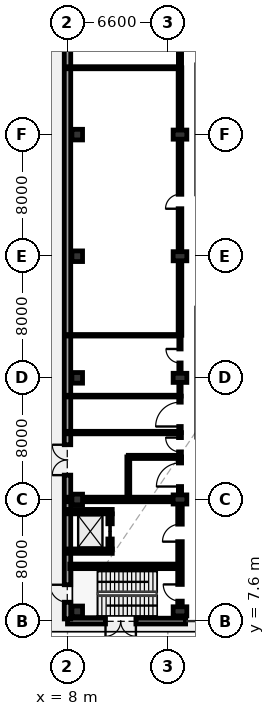
"""IFC4 building model, lengths in metres.
Left out: names, types, materials, properties, quantities, classifications, styles, units other than length and angle.
Written with IfcOpenShell. Run it as: python <this file> out.ifc"""

import sys

from ifc_helpers import new_model, si_unit, direction, frame, frame_2d, origin, origin_2d, place, context, subcontext, project, spatial, rectangle, extrude, element, fill, save


model = new_model("IFC4")
c1 = context("Model", 3, precision=1e-05, world=origin(), true_north=direction((0.0, 1.0)))
c2 = subcontext(c1, "Body", "Model", "MODEL_VIEW")
j1 = project(units=[si_unit("LENGTHUNIT", "METRE"), si_unit("PLANEANGLEUNIT", "RADIAN")], contexts=[c1])
p1 = place(None, origin())
s1 = spatial("IfcSite", under=j1, at=p1, CompositionType="ELEMENT")
p2 = place(p1, origin())
s2 = spatial("IfcBuilding", under=s1, at=p2, CompositionType="ELEMENT")
p3 = place(p2, origin())
s3 = spatial("IfcBuildingStorey", under=s2, at=p3, CompositionType="ELEMENT", Elevation=0.0)
for number, where, z_axis, x_axis in (
    (1, (8.64, 8.24, 0.0), (0.0, 0.0, 1.0), (1.0, 0.0, 0.0)),
    (2, (8.64, 15.6, 0.0), (0.0, 0.0, 1.0), (1.0, 0.0, 0.0)),
    (3, (8.64, 23.6, 0.0), (0.0, 0.0, 1.0), (1.0, 0.0, 0.0)),
    (4, (8.64, 31.6, 0.0), (0.0, 0.0, 1.0), (1.0, 0.0, 0.0)),
    (5, (8.64, 39.6, 0.0), (0.0, 0.0, 1.0), (1.0, 0.0, 0.0)),
):
    element("IfcColumn", number, at=place(p3, frame(where, z_axis=z_axis, x_axis=x_axis)), inside=s3, PredefinedType="COLUMN", context=c2, shape_type="SweptSolid", body=[
        extrude(rectangle(XDim=0.7, YDim=0.7, at=origin_2d()), origin(), (0.0, 0.0, 1.0), 5.4),
    ])
for number, where, z_axis, x_axis in (
    (6, (15.4, 8.24, 0.0), (0.0, 0.0, 1.0), (1.0, 0.0, 0.0)),
    (7, (15.4, 15.6, 0.0), (0.0, 0.0, 1.0), (1.0, 0.0, 0.0)),
    (8, (15.4, 23.6, 0.0), (0.0, 0.0, 1.0), (1.0, 0.0, 0.0)),
    (9, (15.4, 31.6, 0.0), (0.0, 0.0, 1.0), (1.0, 0.0, 0.0)),
    (10, (15.4, 39.6, 0.0), (0.0, 0.0, 1.0), (1.0, 0.0, 0.0)),
):
    element("IfcColumn", number, at=place(p3, frame(where, z_axis=z_axis, x_axis=x_axis)), inside=s3, PredefinedType="COLUMN", context=c2, shape_type="SweptSolid", body=[
        extrude(rectangle(XDim=0.6, YDim=0.9, at=origin_2d()), origin(), (0.0, 0.0, 1.0), 5.4),
    ])
p4 = place(p3, frame((15.77, 7.6, 0.0), z_axis=(0.0, 0.0, 1.0), x_axis=(-1.0, 0.0, 0.0)))
e11 = element("IfcWall", 11, at=p4, inside=s3, PredefinedType="SOLIDWALL", context=c2, shape_type="SweptSolid", body=[
    extrude(rectangle(XDim=7.77, YDim=0.38, at=frame_2d((3.885, 0.0))), origin(), (0.0, 0.0, 1.0), 5.14),
])
p5 = place(p4, frame((3.27, 0.0, 0.0)))
e12 = element("IfcOpeningElement", 12, at=p5, cuts=e11, PredefinedType="OPENING", context=c2, shape_type="SweptSolid", body=[
    extrude(rectangle(XDim=2.0, YDim=2.5, at=frame_2d((1.0, 1.25))), frame((0.0, 0.2, 0.0), z_axis=(0.0, -1.0, 0.0), x_axis=(1.0, 0.0, 0.0)), (0.0, 0.0, 1.0), 0.4),
])
p6 = place(p3, frame((8.0, 7.74, 0.0), z_axis=(0.0, 0.0, 1.0), x_axis=(0.0, 1.0, 0.0)))
e13 = element("IfcWall", 13, at=p6, inside=s3, PredefinedType="SOLIDWALL", context=c2, shape_type="SweptSolid", body=[
    extrude(rectangle(XDim=55.72, YDim=0.425, at=frame_2d((27.86, 0.0))), origin(), (0.0, 0.0, 1.0), 5.14),
])
p7 = place(p6, frame((1.1, 0.0, 0.0)))
e14 = element("IfcOpeningElement", 14, at=p7, cuts=e13, PredefinedType="OPENING", context=c2, shape_type="SweptSolid", body=[
    extrude(rectangle(XDim=1.15, YDim=2.2, at=frame_2d((0.575, 1.1))), frame((0.0, 0.222, 0.0), z_axis=(0.0, -1.0, 0.0), x_axis=(1.0, 0.0, 0.0)), (0.0, 0.0, 1.0), 0.445),
])
p8 = place(p6, frame((9.46, 0.0, 0.0)))
e15 = element("IfcOpeningElement", 15, at=p8, cuts=e13, PredefinedType="OPENING", context=c2, shape_type="SweptSolid", body=[
    extrude(rectangle(XDim=2.0, YDim=2.5, at=frame_2d((1.0, 1.25))), frame((0.0, 0.222, 0.0), z_axis=(0.0, -1.0, 0.0), x_axis=(1.0, 0.0, 0.0)), (0.0, 0.0, 1.0), 0.445),
])
p9 = place(p3, frame((7.85, 15.6, 0.0), z_axis=(0.0, 0.0, 1.0), x_axis=(1.0, 0.0, 0.0)))
e16 = element("IfcWall", 16, at=p9, inside=s3, PredefinedType="SHEAR", context=c2, shape_type="SweptSolid", body=[
    extrude(rectangle(XDim=7.248, YDim=0.3, at=frame_2d((3.624, 0.0))), origin(), (0.0, 0.0, 1.0), 5.14),
])
p10 = place(p3, frame((15.4, 8.692, 0.0), z_axis=(0.0, 0.0, 1.0), x_axis=(0.0, 1.0, 0.0)))
e17 = element("IfcWall", 17, at=p10, inside=s3, PredefinedType="SHEAR", context=c2, shape_type="SweptSolid", body=[
    extrude(rectangle(XDim=6.456, YDim=0.3, at=frame_2d((3.228, 0.0))), origin(), (0.0, 0.0, 1.0), 5.14),
])
p11 = place(p10, frame((0.22, 0.0, 0.0)))
e18 = element("IfcOpeningElement", 18, at=p11, cuts=e17, PredefinedType="OPENING", context=c2, shape_type="SweptSolid", body=[
    extrude(rectangle(XDim=1.1, YDim=2.15, at=frame_2d((0.55, 1.075))), frame((0.0, 0.16, 0.0), z_axis=(0.0, -1.0, 0.0), x_axis=(1.0, 0.0, 0.0)), (0.0, 0.0, 1.0), 0.32),
])
p12 = place(p10, frame((4.133, 0.0, 0.0)))
e19 = element("IfcOpeningElement", 19, at=p12, cuts=e17, PredefinedType="OPENING", context=c2, shape_type="SweptSolid", body=[
    extrude(rectangle(XDim=1.15, YDim=2.2, at=frame_2d((0.575, 1.1))), frame((0.0, 0.16, 0.0), z_axis=(0.0, -1.0, 0.0), x_axis=(1.0, 0.0, 0.0)), (0.0, 0.0, 1.0), 0.32),
])
p13 = place(p3, frame((8.15, 11.2, 0.0), z_axis=(0.0, 0.0, 1.0), x_axis=(1.0, 0.0, 0.0)))
e20 = element("IfcWall", 20, at=p13, inside=s3, PredefinedType="SHEAR", context=c2, shape_type="SweptSolid", body=[
    extrude(rectangle(XDim=7.1, YDim=0.3, at=frame_2d((3.55, 0.0))), origin(), (0.0, 0.0, 1.0), 5.14),
])
for number, where, z_axis, x_axis in (
    (21, (8.055, 12.2, 0.0), (0.0, 0.0, 1.0), (1.0, 0.0, 0.0)),
    (22, (8.055, 14.8, 0.0), (0.0, 0.0, 1.0), (1.0, 0.0, 0.0)),
):
    element("IfcWall", number, at=place(p3, frame(where, z_axis=z_axis, x_axis=x_axis)), inside=s3, PredefinedType="SHEAR", context=c2, shape_type="SweptSolid", body=[
        extrude(rectangle(XDim=2.89, YDim=0.29, at=frame_2d((1.445, 0.0))), origin(), (0.0, 0.0, 1.0), 5.14),
    ])
p14 = place(p3, frame((10.8, 12.345, 0.0), z_axis=(0.0, 0.0, 1.0), x_axis=(0.0, 1.0, 0.0)))
e23 = element("IfcWall", 23, at=p14, inside=s3, PredefinedType="SHEAR", context=c2, shape_type="SweptSolid", body=[
    extrude(rectangle(XDim=2.31, YDim=0.29, at=frame_2d((1.155, 0.0))), origin(), (0.0, 0.0, 1.0), 5.14),
])
p15 = place(p14, frame((0.655, 0.0, 0.0)))
e24 = element("IfcOpeningElement", 24, at=p15, cuts=e23, PredefinedType="OPENING", context=c2, shape_type="SweptSolid", body=[
    extrude(rectangle(XDim=1.0, YDim=2.15, at=frame_2d((0.5, 1.075))), frame((0.0, 0.155, 0.0), z_axis=(0.0, -1.0, 0.0), x_axis=(1.0, 0.0, 0.0)), (0.0, 0.0, 1.0), 0.31),
])
p16 = place(p3, frame((15.4, 16.052, 0.0), z_axis=(0.0, 0.0, 1.0), x_axis=(0.0, 1.0, 0.0)))
e25 = element("IfcWall", 25, at=p16, inside=s3, PredefinedType="PARTITIONING", context=c2, shape_type="SweptSolid", body=[
    extrude(rectangle(XDim=2.348, YDim=0.21, at=frame_2d((1.174, 0.0))), origin(), (0.0, 0.0, 1.0), 4.29),
])
p17 = place(p16, frame((0.399, 0.0, 0.0)))
e26 = element("IfcOpeningElement", 26, at=p17, cuts=e25, PredefinedType="OPENING", context=c2, shape_type="SweptSolid", body=[
    extrude(rectangle(XDim=1.55, YDim=2.25, at=frame_2d((0.775, 1.125))), frame((0.0, 0.115, 0.0), z_axis=(0.0, -1.0, 0.0), x_axis=(1.0, 0.0, 0.0)), (0.0, 0.0, 1.0), 0.23),
])
p18 = place(p3, frame((15.4, 18.4, 0.0), z_axis=(0.0, 0.0, 1.0), x_axis=(0.0, 1.0, 0.0)))
e27 = element("IfcWall", 27, at=p18, inside=s3, PredefinedType="PARTITIONING", context=c2, shape_type="SweptSolid", body=[
    extrude(rectangle(XDim=1.6, YDim=0.19, at=frame_2d((0.8, 0.0))), origin(), (0.0, 0.0, 1.0), 4.29),
])
p19 = place(p18, frame((0.33, 0.0, 0.0)))
e28 = element("IfcOpeningElement", 28, at=p19, cuts=e27, PredefinedType="OPENING", context=c2, shape_type="SweptSolid", body=[
    extrude(rectangle(XDim=0.94, YDim=2.15, at=frame_2d((0.47, 1.075))), frame((0.0, 0.105, 0.0), z_axis=(0.0, -1.0, 0.0), x_axis=(1.0, 0.0, 0.0)), (0.0, 0.0, 1.0), 0.21),
])
p20 = place(p3, frame((15.4, 20.0, 0.0), z_axis=(0.0, 0.0, 1.0), x_axis=(0.0, 1.0, 0.0)))
e29 = element("IfcWall", 29, at=p20, inside=s3, PredefinedType="PARTITIONING", context=c2, shape_type="SweptSolid", body=[
    extrude(rectangle(XDim=2.4, YDim=0.165, at=frame_2d((1.2, 0.0))), origin(), (0.0, 0.0, 1.0), 4.29),
])
p21 = place(p20, frame((0.4, 0.0, 0.0)))
e30 = element("IfcOpeningElement", 30, at=p21, cuts=e29, PredefinedType="OPENING", context=c2, shape_type="SweptSolid", body=[
    extrude(rectangle(XDim=1.6, YDim=2.3, at=frame_2d((0.8, 1.15))), frame((0.0, 0.093, 0.0), z_axis=(0.0, -1.0, 0.0), x_axis=(1.0, 0.0, 0.0)), (0.0, 0.0, 1.0), 0.185),
])
p22 = place(p3, frame((15.4, 22.4, 0.0), z_axis=(0.0, 0.0, 1.0), x_axis=(0.0, 1.0, 0.0)))
e31 = element("IfcWall", 31, at=p22, inside=s3, PredefinedType="PARTITIONING", context=c2, shape_type="SweptSolid", body=[
    extrude(rectangle(XDim=4.0, YDim=0.15, at=frame_2d((2.0, 0.0))), origin(), (0.0, 0.0, 1.0), 4.29),
])
p23 = place(p22, frame((2.18, 0.0, 0.0)))
e32 = element("IfcOpeningElement", 32, at=p23, cuts=e31, PredefinedType="OPENING", context=c2, shape_type="SweptSolid", body=[
    extrude(rectangle(XDim=0.92, YDim=2.1, at=frame_2d((0.46, 1.05))), frame((0.0, 0.085, 0.0), z_axis=(0.0, -1.0, 0.0), x_axis=(1.0, 0.0, 0.0)), (0.0, 0.0, 1.0), 0.17),
])
p24 = place(p3, frame((15.4, 26.4, 0.0), z_axis=(0.0, 0.0, 1.0), x_axis=(0.0, 1.0, 0.0)))
e33 = element("IfcWall", 33, at=p24, inside=s3, PredefinedType="PARTITIONING", context=c2, shape_type="SweptSolid", body=[
    extrude(rectangle(XDim=17.6, YDim=0.24, at=frame_2d((8.8, 0.0))), origin(), (0.0, 0.0, 1.0), 4.29),
])
p25 = place(p24, frame((8.325, 0.0, 0.0)))
e34 = element("IfcOpeningElement", 34, at=p25, cuts=e33, PredefinedType="OPENING", context=c2, shape_type="SweptSolid", body=[
    extrude(rectangle(XDim=0.95, YDim=2.1, at=frame_2d((0.475, 1.05))), frame((0.0, 0.13, 0.0), z_axis=(0.0, -1.0, 0.0), x_axis=(1.0, 0.0, 0.0)), (0.0, 0.0, 1.0), 0.26),
])
p26 = place(p3, frame((15.4, 44.0, 0.0), z_axis=(0.0, 0.0, 1.0), x_axis=(0.0, 1.0, 0.0)))
e35 = element("IfcWall", 35, at=p26, inside=s3, PredefinedType="PARTITIONING", context=c2, shape_type="SweptSolid", body=[
    extrude(rectangle(XDim=19.6, YDim=0.21, at=frame_2d((9.8, 0.0))), origin(), (0.0, 0.0, 1.0), 4.29),
])
p27 = place(p26, frame((9.29, 0.0, 0.0)))
e36 = element("IfcOpeningElement", 36, at=p27, cuts=e35, PredefinedType="OPENING", context=c2, shape_type="SweptSolid", body=[
    extrude(rectangle(XDim=1.02, YDim=2.1, at=frame_2d((0.51, 1.05))), frame((0.0, 0.115, 0.0), z_axis=(0.0, -1.0, 0.0), x_axis=(1.0, 0.0, 0.0)), (0.0, 0.0, 1.0), 0.23),
])
p28 = place(p3, frame((12.0, 18.4, 0.0), z_axis=(0.0, 0.0, 1.0), x_axis=(1.0, 0.0, 0.0)))
e37 = element("IfcWall", 37, at=p28, inside=s3, PredefinedType="PARTITIONING", context=c2, shape_type="SweptSolid", body=[
    extrude(rectangle(XDim=3.4, YDim=0.21, at=frame_2d((1.7, 0.0))), origin(), (0.0, 0.0, 1.0), 5.14),
])
p29 = place(p3, frame((12.0, 15.6, 0.0), z_axis=(0.0, 0.0, 1.0), x_axis=(0.0, 1.0, 0.0)))
e38 = element("IfcWall", 38, at=p29, inside=s3, PredefinedType="PARTITIONING", context=c2, shape_type="SweptSolid", body=[
    extrude(rectangle(XDim=2.8, YDim=0.19, at=frame_2d((1.4, 0.0))), origin(), (0.0, 0.0, 1.0), 5.14),
])
p30 = place(p3, frame((8.0, 20.0, 0.0), z_axis=(0.0, 0.0, 1.0), x_axis=(1.0, 0.0, 0.0)))
e39 = element("IfcWall", 39, at=p30, inside=s3, PredefinedType="PARTITIONING", context=c2, shape_type="SweptSolid", body=[
    extrude(rectangle(XDim=7.4, YDim=0.165, at=frame_2d((3.7, 0.0))), origin(), (0.0, 0.0, 1.0), 5.14),
])
p31 = place(p3, frame((8.0, 22.4, 0.0), z_axis=(0.0, 0.0, 1.0), x_axis=(1.0, 0.0, 0.0)))
e40 = element("IfcWall", 40, at=p31, inside=s3, PredefinedType="PARTITIONING", context=c2, shape_type="SweptSolid", body=[
    extrude(rectangle(XDim=7.4, YDim=0.115, at=frame_2d((3.7, 0.0))), origin(), (0.0, 0.0, 1.0), 5.14),
])
p32 = place(p3, frame((8.0, 26.4, 0.0), z_axis=(0.0, 0.0, 1.0), x_axis=(1.0, 0.0, 0.0)))
e41 = element("IfcWall", 41, at=p32, inside=s3, PredefinedType="PARTITIONING", context=c2, shape_type="SweptSolid", body=[
    extrude(rectangle(XDim=7.4, YDim=0.1, at=frame_2d((3.7, 0.0))), origin(), (0.0, 0.0, 1.0), 5.14),
])
p33 = place(p3, frame((8.0, 44.0, 0.0), z_axis=(0.0, 0.0, 1.0), x_axis=(1.0, 0.0, 0.0)))
e42 = element("IfcWall", 42, at=p33, inside=s3, PredefinedType="PARTITIONING", context=c2, shape_type="SweptSolid", body=[
    extrude(rectangle(XDim=7.4, YDim=0.135, at=frame_2d((3.7, 0.0))), origin(), (0.0, 0.0, 1.0), 5.14),
])
p34 = place(p7, origin())
e43 = element("IfcDoor", 43, at=p34, inside=s3, OperationType="SINGLE_SWING_RIGHT", PredefinedType="DOOR", context=c2, shape_type="SweptSolid", body=[
    extrude(rectangle(XDim=1.15, YDim=2.2, at=frame_2d((0.575, 1.1))), frame((0.0, 0.025, 0.0), z_axis=(0.0, -1.0, 0.0), x_axis=(1.0, 0.0, 0.0)), (0.0, 0.0, 1.0), 0.05),
])
fill(e14, e43)
p35 = place(p5, origin())
e44 = element("IfcDoor", 44, at=p35, inside=s3, OperationType="DOUBLE_SWING_LEFT", PredefinedType="DOOR", context=c2, shape_type="SweptSolid", body=[
    extrude(rectangle(XDim=2.0, YDim=2.5, at=frame_2d((1.0, 1.25))), frame((0.0, 0.025, 0.0), z_axis=(0.0, -1.0, 0.0), x_axis=(1.0, 0.0, 0.0)), (0.0, 0.0, 1.0), 0.05),
])
fill(e12, e44)
p36 = place(p8, origin())
e45 = element("IfcDoor", 45, at=p36, inside=s3, OperationType="DOUBLE_SWING_LEFT", PredefinedType="DOOR", context=c2, shape_type="SweptSolid", body=[
    extrude(rectangle(XDim=2.0, YDim=2.5, at=frame_2d((1.0, 1.25))), frame((0.0, 0.025, 0.0), z_axis=(0.0, -1.0, 0.0), x_axis=(1.0, 0.0, 0.0)), (0.0, 0.0, 1.0), 0.05),
])
fill(e15, e45)
p37 = place(p11, origin())
e46 = element("IfcDoor", 46, at=p37, inside=s3, OperationType="SINGLE_SWING_RIGHT", PredefinedType="DOOR", context=c2, shape_type="SweptSolid", body=[
    extrude(rectangle(XDim=1.1, YDim=2.15, at=frame_2d((0.55, 1.075))), frame((0.0, 0.025, 0.0), z_axis=(0.0, -1.0, 0.0), x_axis=(1.0, 0.0, 0.0)), (0.0, 0.0, 1.0), 0.05),
])
fill(e18, e46)
p38 = place(p12, origin())
e47 = element("IfcDoor", 47, at=p38, inside=s3, OperationType="SINGLE_SWING_LEFT", PredefinedType="DOOR", context=c2, shape_type="SweptSolid", body=[
    extrude(rectangle(XDim=1.15, YDim=2.2, at=frame_2d((0.575, 1.1))), frame((0.0, 0.025, 0.0), z_axis=(0.0, -1.0, 0.0), x_axis=(1.0, 0.0, 0.0)), (0.0, 0.0, 1.0), 0.05),
])
fill(e19, e47)
p39 = place(p15, origin())
e48 = element("IfcDoor", 48, at=p39, inside=s3, OperationType="SLIDING_TO_LEFT", PredefinedType="DOOR", context=c2, shape_type="SweptSolid", body=[
    extrude(rectangle(XDim=1.0, YDim=2.15, at=frame_2d((0.5, 1.075))), frame((0.0, 0.025, 0.0), z_axis=(0.0, -1.0, 0.0), x_axis=(1.0, 0.0, 0.0)), (0.0, 0.0, 1.0), 0.05),
])
fill(e24, e48)
p40 = place(p17, origin())
e49 = element("IfcDoor", 49, at=p40, inside=s3, OperationType="SINGLE_SWING_LEFT", PredefinedType="DOOR", context=c2, shape_type="SweptSolid", body=[
    extrude(rectangle(XDim=1.55, YDim=2.25, at=frame_2d((0.775, 1.125))), frame((0.0, 0.025, 0.0), z_axis=(0.0, -1.0, 0.0), x_axis=(1.0, 0.0, 0.0)), (0.0, 0.0, 1.0), 0.05),
])
fill(e26, e49)
p41 = place(p19, origin())
e50 = element("IfcDoor", 50, at=p41, inside=s3, OperationType="SINGLE_SWING_RIGHT", PredefinedType="DOOR", context=c2, shape_type="SweptSolid", body=[
    extrude(rectangle(XDim=0.94, YDim=2.15, at=frame_2d((0.47, 1.075))), frame((0.0, 0.025, 0.0), z_axis=(0.0, -1.0, 0.0), x_axis=(1.0, 0.0, 0.0)), (0.0, 0.0, 1.0), 0.05),
])
fill(e28, e50)
p42 = place(p21, origin())
e51 = element("IfcDoor", 51, at=p42, inside=s3, OperationType="SINGLE_SWING_LEFT", PredefinedType="DOOR", context=c2, shape_type="SweptSolid", body=[
    extrude(rectangle(XDim=1.6, YDim=2.3, at=frame_2d((0.8, 1.15))), frame((0.0, 0.025, 0.0), z_axis=(0.0, -1.0, 0.0), x_axis=(1.0, 0.0, 0.0)), (0.0, 0.0, 1.0), 0.05),
])
fill(e30, e51)
p43 = place(p23, origin())
e52 = element("IfcDoor", 52, at=p43, inside=s3, OperationType="SINGLE_SWING_RIGHT", PredefinedType="DOOR", context=c2, shape_type="SweptSolid", body=[
    extrude(rectangle(XDim=0.92, YDim=2.1, at=frame_2d((0.46, 1.05))), frame((0.0, 0.025, 0.0), z_axis=(0.0, -1.0, 0.0), x_axis=(1.0, 0.0, 0.0)), (0.0, 0.0, 1.0), 0.05),
])
fill(e32, e52)
p44 = place(p25, origin())
e53 = element("IfcDoor", 53, at=p44, inside=s3, OperationType="SINGLE_SWING_LEFT", PredefinedType="DOOR", context=c2, shape_type="SweptSolid", body=[
    extrude(rectangle(XDim=0.95, YDim=2.1, at=frame_2d((0.475, 1.05))), frame((0.0, 0.025, 0.0), z_axis=(0.0, -1.0, 0.0), x_axis=(1.0, 0.0, 0.0)), (0.0, 0.0, 1.0), 0.05),
])
fill(e34, e53)
save(model, sys.argv[1])
